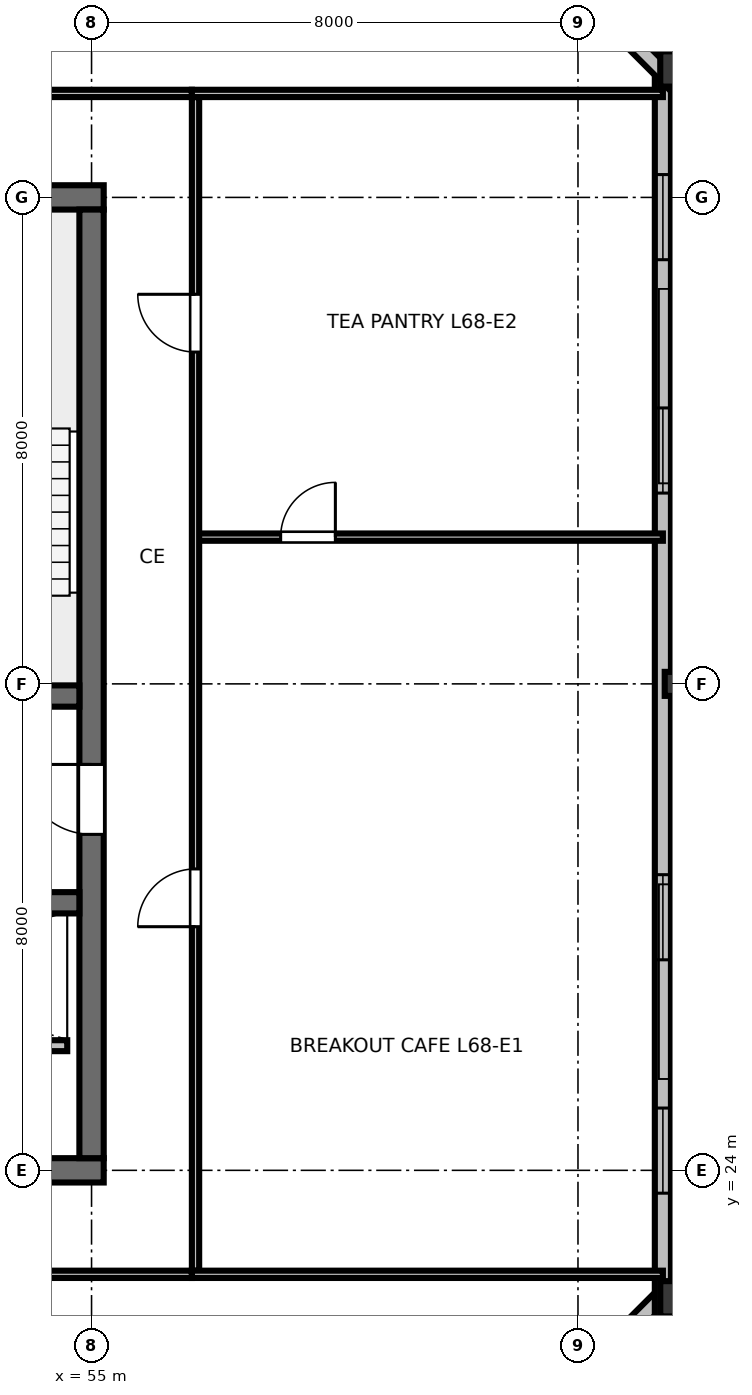
"""IFC4 building model, lengths in metres.
Left out: names, types, materials, properties, quantities, classifications, styles, units other than length and angle.
Written with IfcOpenShell. Run it as: python <this file> out.ifc"""

import sys

from ifc_helpers import new_model, si_unit, direction, frame, frame_2d, origin, origin_2d, place, context, subcontext, project, spatial, rectangle, hollow_rectangle, i_section, extrude, element, fill, save


model = new_model("IFC4")
c1 = context("Model", 3, precision=1e-05, world=origin(), true_north=direction((0.0, 1.0)))
c2 = subcontext(c1, "Body", "Model", "MODEL_VIEW")
j1 = project(units=[si_unit("LENGTHUNIT", "METRE"), si_unit("PLANEANGLEUNIT", "RADIAN")], contexts=[c1])
p1 = place(None, origin())
s1 = spatial("IfcSite", under=j1, at=p1, CompositionType="ELEMENT")
p2 = place(p1, origin())
s2 = spatial("IfcBuilding", under=s1, at=p2, CompositionType="ELEMENT")
p3 = place(p2, frame((0.0, 0.0, 257.4)))
s3 = spatial("IfcBuildingStorey", under=s2, at=p3, CompositionType="ELEMENT", Elevation=257.4)
p4 = place(p3, frame((36.8, 24.0, 0.0), z_axis=(0.0, 0.0, 1.0), x_axis=(1.0, 0.0, 0.0)))
e1 = element("IfcWall", 1, at=p4, inside=s3, PredefinedType="SHEAR", context=c2, shape_type="SweptSolid", body=[
    extrude(rectangle(XDim=18.4, YDim=0.4, at=frame_2d((9.2, 0.0))), origin(), (0.0, 0.0, 1.0), 3.36),
])
p5 = place(p4, frame((13.4, 0.0, 0.0)))
e2 = element("IfcOpeningElement", 2, at=p5, cuts=e1, PredefinedType="OPENING", context=c2, shape_type="SweptSolid", body=[
    extrude(rectangle(XDim=1.6, YDim=2.15, at=frame_2d((0.8, 1.075))), frame((0.0, 0.21, 0.0), z_axis=(0.0, -1.0, 0.0), x_axis=(1.0, 0.0, 0.0)), (0.0, 0.0, 1.0), 0.42),
])
p6 = place(p3, frame((36.8, 40.0, 0.0), z_axis=(0.0, 0.0, 1.0), x_axis=(1.0, 0.0, 0.0)))
e3 = element("IfcWall", 3, at=p6, inside=s3, PredefinedType="SHEAR", context=c2, shape_type="SweptSolid", body=[
    extrude(rectangle(XDim=18.4, YDim=0.4, at=frame_2d((9.2, 0.0))), origin(), (0.0, 0.0, 1.0), 3.36),
])
p7 = place(p6, frame((8.7, 0.0, 0.0)))
e4 = element("IfcOpeningElement", 4, at=p7, cuts=e3, PredefinedType="OPENING", context=c2, shape_type="SweptSolid", body=[
    extrude(rectangle(XDim=1.0, YDim=2.15, at=frame_2d((0.5, 1.075))), frame((0.0, 0.21, 0.0), z_axis=(0.0, -1.0, 0.0), x_axis=(1.0, 0.0, 0.0)), (0.0, 0.0, 1.0), 0.42),
])
p8 = place(p3, frame((55.0, 24.2, 0.0), z_axis=(0.0, 0.0, 1.0), x_axis=(0.0, 1.0, 0.0)))
e5 = element("IfcWall", 5, at=p8, inside=s3, PredefinedType="SHEAR", context=c2, shape_type="SweptSolid", body=[
    extrude(rectangle(XDim=15.6, YDim=0.4, at=frame_2d((7.8, 0.0))), origin(), (0.0, 0.0, 1.0), 3.36),
])
p9 = place(p8, frame((5.325, 0.0, 0.0)))
e6 = element("IfcOpeningElement", 6, at=p9, cuts=e5, PredefinedType="OPENING", context=c2, shape_type="SweptSolid", body=[
    extrude(rectangle(XDim=1.15, YDim=2.15, at=frame_2d((0.575, 1.075))), frame((0.0, 0.21, 0.0), z_axis=(0.0, -1.0, 0.0), x_axis=(1.0, 0.0, 0.0)), (0.0, 0.0, 1.0), 0.42),
])
p10 = place(p3, frame((37.2, 31.8, 0.0), z_axis=(0.0, 0.0, 1.0), x_axis=(1.0, 0.0, 0.0)))
e7 = element("IfcWall", 7, at=p10, inside=s3, PredefinedType="SHEAR", context=c2, shape_type="SweptSolid", body=[
    extrude(rectangle(XDim=17.6, YDim=0.35, at=frame_2d((8.8, 0.0))), origin(), (0.0, 0.0, 1.0), 3.36),
])
p11 = place(p10, frame((0.85, 0.0, 0.0)))
e8 = element("IfcOpeningElement", 8, at=p11, cuts=e7, PredefinedType="OPENING", context=c2, shape_type="SweptSolid", body=[
    extrude(rectangle(XDim=1.1, YDim=2.15, at=frame_2d((0.55, 1.075))), frame((0.0, 0.185, 0.0), z_axis=(0.0, -1.0, 0.0), x_axis=(1.0, 0.0, 0.0)), (0.0, 0.0, 1.0), 0.37),
])
p12 = place(p10, frame((14.75, 0.0, 0.0)))
e9 = element("IfcOpeningElement", 9, at=p12, cuts=e7, PredefinedType="OPENING", context=c2, shape_type="SweptSolid", body=[
    extrude(rectangle(XDim=1.1, YDim=2.15, at=frame_2d((0.55, 1.075))), frame((0.0, 0.185, 0.0), z_axis=(0.0, -1.0, 0.0), x_axis=(1.0, 0.0, 0.0)), (0.0, 0.0, 1.0), 0.37),
])
p13 = place(p3, frame((37.2, 28.4, 0.0), z_axis=(0.0, 0.0, 1.0), x_axis=(1.0, 0.0, 0.0)))
e10 = element("IfcWall", 10, at=p13, inside=s3, PredefinedType="SHEAR", context=c2, shape_type="SweptSolid", body=[
    extrude(rectangle(XDim=17.6, YDim=0.35, at=frame_2d((8.8, 0.0))), origin(), (0.0, 0.0, 1.0), 3.36),
])
p14 = place(p3, frame((64.703, 21.888, 0.0), z_axis=(-0.177662325412, 0.155507284832, 0.971727113182), x_axis=(0.731191579458, -0.640009731663, 0.23610679259)))
e11 = element("IfcColumn", 11, at=p14, inside=s3, PredefinedType="COLUMN", context=c2, shape_type="SweptSolid", body=[
    extrude(hollow_rectangle(XDim=0.58, YDim=0.7, WallThickness=0.032, at=origin_2d()), origin(), (0.0, 0.0, 1.0), 3.471),
])
p15 = place(p3, frame((64.616, 32.0, 0.0), z_axis=(-0.179023300051, 0.0, 0.98384483433), x_axis=(0.98384483433, 0.0, 0.179023300051)))
e12 = element("IfcColumn", 12, at=p15, inside=s3, PredefinedType="COLUMN", context=c2, shape_type="SweptSolid", body=[
    extrude(i_section(OverallWidth=0.395, OverallDepth=0.38, WebThickness=0.019, FlangeThickness=0.03, FilletRadius=0.025, at=origin_2d()), origin(), (0.0, 0.0, 1.0), 3.428),
])
p16 = place(p3, frame((64.703, 42.112, 0.0), z_axis=(-0.177662325412, -0.155507284832, 0.971727113182), x_axis=(0.731191579458, 0.640009731663, 0.23610679259)))
e13 = element("IfcColumn", 13, at=p16, inside=s3, PredefinedType="COLUMN", context=c2, shape_type="SweptSolid", body=[
    extrude(hollow_rectangle(XDim=0.58, YDim=0.7, WallThickness=0.032, at=origin_2d()), origin(), (0.0, 0.0, 1.0), 3.471),
])
p17 = place(p3, frame((57.193, 14.731, 0.0), z_axis=(0.0, 0.0, 1.0), x_axis=(0.707106781187, 0.707106781187, 0.0)))
e14 = element("IfcWall", 14, at=p17, inside=s3, PredefinedType="STANDARD", context=c2, shape_type="SweptSolid", body=[
    extrude(rectangle(XDim=10.816, YDim=0.265, at=frame_2d((5.408, 0.0))), origin(), (0.0, 0.0, 1.0), 3.375),
])
p18 = place(p3, frame((64.396, 21.305, 0.0), z_axis=(0.0, 0.0, 1.0), x_axis=(0.0, 1.0, 0.0)))
e15 = element("IfcWall", 15, at=p18, inside=s3, PredefinedType="STANDARD", context=c2, shape_type="SweptSolid", body=[
    extrude(rectangle(XDim=21.389, YDim=0.265, at=frame_2d((10.695, 0.0))), origin(), (0.0, 0.0, 1.0), 2.832),
])
p19 = place(p18, frame((2.319, 0.0, 0.85)))
e16 = element("IfcOpeningElement", 16, at=p19, cuts=e15, PredefinedType="OPENING", context=c2, shape_type="SweptSolid", body=[
    extrude(rectangle(XDim=1.4, YDim=1.2, at=frame_2d((0.7, 0.6))), frame((0.0, 0.142, 0.0), z_axis=(0.0, -1.0, 0.0), x_axis=(1.0, 0.0, 0.0)), (0.0, 0.0, 1.0), 0.285),
])
p20 = place(p18, frame((6.157, 0.0, 0.85)))
e17 = element("IfcOpeningElement", 17, at=p20, cuts=e15, PredefinedType="OPENING", context=c2, shape_type="SweptSolid", body=[
    extrude(rectangle(XDim=1.4, YDim=1.2, at=frame_2d((0.7, 0.6))), frame((0.0, 0.142, 0.0), z_axis=(0.0, -1.0, 0.0), x_axis=(1.0, 0.0, 0.0)), (0.0, 0.0, 1.0), 0.285),
])
p21 = place(p18, frame((13.832, 0.0, 0.85)))
e18 = element("IfcOpeningElement", 18, at=p21, cuts=e15, PredefinedType="OPENING", context=c2, shape_type="SweptSolid", body=[
    extrude(rectangle(XDim=1.4, YDim=1.2, at=frame_2d((0.7, 0.6))), frame((0.0, 0.142, 0.0), z_axis=(0.0, -1.0, 0.0), x_axis=(1.0, 0.0, 0.0)), (0.0, 0.0, 1.0), 0.285),
])
p22 = place(p18, frame((17.67, 0.0, 0.85)))
e19 = element("IfcOpeningElement", 19, at=p22, cuts=e15, PredefinedType="OPENING", context=c2, shape_type="SweptSolid", body=[
    extrude(rectangle(XDim=1.4, YDim=1.2, at=frame_2d((0.7, 0.6))), frame((0.0, 0.142, 0.0), z_axis=(0.0, -1.0, 0.0), x_axis=(1.0, 0.0, 0.0)), (0.0, 0.0, 1.0), 0.285),
])
p23 = place(p3, frame((64.841, 41.62, 0.0), z_axis=(0.0, 0.0, 1.0), x_axis=(-0.707106781187, 0.707106781187, 0.0)))
e20 = element("IfcWall", 20, at=p23, inside=s3, PredefinedType="STANDARD", context=c2, shape_type="SweptSolid", body=[
    extrude(rectangle(XDim=10.816, YDim=0.265, at=frame_2d((5.408, 0.0))), origin(), (0.0, 0.0, 1.0), 3.375),
])
p24 = place(p3, frame((47.6, 26.05, 0.0), z_axis=(0.0, 0.0, 1.0), x_axis=(1.0, 0.0, 0.0)))
e21 = element("IfcWall", 21, at=p24, inside=s3, PredefinedType="PARTITIONING", context=c2, shape_type="SweptSolid", body=[
    extrude(rectangle(XDim=7.0, YDim=0.18, at=frame_2d((3.5, 0.0))), origin(), (0.0, 0.0, 1.0), 3.375),
])
p25 = place(p24, frame((1.2, 0.0, 0.0)))
e22 = element("IfcOpeningElement", 22, at=p25, cuts=e21, PredefinedType="OPENING", context=c2, shape_type="SweptSolid", body=[
    extrude(rectangle(XDim=1.05, YDim=2.15, at=frame_2d((0.525, 1.075))), frame((0.0, 0.1, 0.0), z_axis=(0.0, -1.0, 0.0), x_axis=(1.0, 0.0, 0.0)), (0.0, 0.0, 1.0), 0.2),
])
p26 = place(p24, frame((3.4, 0.0, 0.0)))
e23 = element("IfcOpeningElement", 23, at=p26, cuts=e21, PredefinedType="OPENING", context=c2, shape_type="SweptSolid", body=[
    extrude(rectangle(XDim=1.05, YDim=2.15, at=frame_2d((0.525, 1.075))), frame((0.0, 0.1, 0.0), z_axis=(0.0, -1.0, 0.0), x_axis=(1.0, 0.0, 0.0)), (0.0, 0.0, 1.0), 0.2),
])
p27 = place(p3, frame((35.35, 22.29, 0.0), z_axis=(0.0, 0.0, 1.0), x_axis=(1.0, 0.0, 0.0)))
e24 = element("IfcWall", 24, at=p27, inside=s3, PredefinedType="PARTITIONING", context=c2, shape_type="SweptSolid", body=[
    extrude(rectangle(XDim=21.3, YDim=0.12, at=frame_2d((10.65, 0.0))), origin(), (0.0, 0.0, 1.0), 2.655),
])
p28 = place(p27, frame((3.767, 0.0, 0.0)))
e25 = element("IfcOpeningElement", 25, at=p28, cuts=e24, PredefinedType="OPENING", context=c2, shape_type="SweptSolid", body=[
    extrude(rectangle(XDim=0.95, YDim=2.15, at=frame_2d((0.475, 1.075))), frame((0.0, 0.07, 0.0), z_axis=(0.0, -1.0, 0.0), x_axis=(1.0, 0.0, 0.0)), (0.0, 0.0, 1.0), 0.14),
])
p29 = place(p27, frame((15.925, 0.0, 0.0)))
e26 = element("IfcOpeningElement", 26, at=p29, cuts=e24, PredefinedType="OPENING", context=c2, shape_type="SweptSolid", body=[
    extrude(rectangle(XDim=0.95, YDim=2.15, at=frame_2d((0.475, 1.075))), frame((0.0, 0.07, 0.0), z_axis=(0.0, -1.0, 0.0), x_axis=(1.0, 0.0, 0.0)), (0.0, 0.0, 1.0), 0.14),
])
p30 = place(p3, frame((35.35, 41.71, 0.0), z_axis=(0.0, 0.0, 1.0), x_axis=(1.0, 0.0, 0.0)))
e27 = element("IfcWall", 27, at=p30, inside=s3, PredefinedType="PARTITIONING", context=c2, shape_type="SweptSolid", body=[
    extrude(rectangle(XDim=21.3, YDim=0.12, at=frame_2d((10.65, 0.0))), origin(), (0.0, 0.0, 1.0), 2.655),
])
p31 = place(p30, frame((3.472, 0.0, 0.0)))
e28 = element("IfcOpeningElement", 28, at=p31, cuts=e27, PredefinedType="OPENING", context=c2, shape_type="SweptSolid", body=[
    extrude(rectangle(XDim=0.95, YDim=2.15, at=frame_2d((0.475, 1.075))), frame((0.0, 0.07, 0.0), z_axis=(0.0, -1.0, 0.0), x_axis=(1.0, 0.0, 0.0)), (0.0, 0.0, 1.0), 0.14),
])
p32 = place(p30, frame((12.975, 0.0, 0.0)))
e29 = element("IfcOpeningElement", 29, at=p32, cuts=e27, PredefinedType="OPENING", context=c2, shape_type="SweptSolid", body=[
    extrude(rectangle(XDim=0.95, YDim=2.15, at=frame_2d((0.475, 1.075))), frame((0.0, 0.07, 0.0), z_axis=(0.0, -1.0, 0.0), x_axis=(1.0, 0.0, 0.0)), (0.0, 0.0, 1.0), 0.14),
])
p33 = place(p30, frame((17.735, 0.0, 0.0)))
e30 = element("IfcOpeningElement", 30, at=p33, cuts=e27, PredefinedType="OPENING", context=c2, shape_type="SweptSolid", body=[
    extrude(rectangle(XDim=0.95, YDim=2.15, at=frame_2d((0.475, 1.075))), frame((0.0, 0.07, 0.0), z_axis=(0.0, -1.0, 0.0), x_axis=(1.0, 0.0, 0.0)), (0.0, 0.0, 1.0), 0.14),
])
p34 = place(p3, frame((56.71, 34.413, 0.0), z_axis=(0.0, 0.0, 1.0), x_axis=(1.0, 0.0, 0.0)))
e31 = element("IfcWall", 31, at=p34, inside=s3, PredefinedType="PARTITIONING", context=c2, shape_type="SweptSolid", body=[
    extrude(rectangle(XDim=7.687, YDim=0.12, at=frame_2d((3.843, 0.0))), origin(), (0.0, 0.0, 1.0), 2.655),
])
p35 = place(p34, frame((1.4, 0.0, 0.0)))
e32 = element("IfcOpeningElement", 32, at=p35, cuts=e31, PredefinedType="OPENING", context=c2, shape_type="SweptSolid", body=[
    extrude(rectangle(XDim=0.9, YDim=2.15, at=frame_2d((0.45, 1.075))), frame((0.0, 0.07, 0.0), z_axis=(0.0, -1.0, 0.0), x_axis=(1.0, 0.0, 0.0)), (0.0, 0.0, 1.0), 0.14),
])
p36 = place(p3, frame((56.71, 22.35, 0.0), z_axis=(0.0, 0.0, 1.0), x_axis=(0.0, 1.0, 0.0)))
e33 = element("IfcWall", 33, at=p36, inside=s3, PredefinedType="PARTITIONING", context=c2, shape_type="SweptSolid", body=[
    extrude(rectangle(XDim=19.3, YDim=0.12, at=frame_2d((9.65, 0.0))), origin(), (0.0, 0.0, 1.0), 2.655),
])
p37 = place(p36, frame((5.657, 0.0, 0.0)))
e34 = element("IfcOpeningElement", 34, at=p37, cuts=e33, PredefinedType="OPENING", context=c2, shape_type="SweptSolid", body=[
    extrude(rectangle(XDim=0.95, YDim=2.15, at=frame_2d((0.475, 1.075))), frame((0.0, 0.07, 0.0), z_axis=(0.0, -1.0, 0.0), x_axis=(1.0, 0.0, 0.0)), (0.0, 0.0, 1.0), 0.14),
])
p38 = place(p36, frame((15.107, 0.0, 0.0)))
e35 = element("IfcOpeningElement", 35, at=p38, cuts=e33, PredefinedType="OPENING", context=c2, shape_type="SweptSolid", body=[
    extrude(rectangle(XDim=0.95, YDim=2.15, at=frame_2d((0.475, 1.075))), frame((0.0, 0.07, 0.0), z_axis=(0.0, -1.0, 0.0), x_axis=(1.0, 0.0, 0.0)), (0.0, 0.0, 1.0), 0.14),
])
for number, where, z_axis, x_axis in (
    (36, (56.65, 22.29, 0.0), (0.0, 0.0, 1.0), (1.0, 0.0, 0.0)),
    (37, (56.65, 41.71, 0.0), (0.0, 0.0, 1.0), (1.0, 0.0, 0.0)),
):
    element("IfcWall", number, at=place(p3, frame(where, z_axis=z_axis, x_axis=x_axis)), inside=s3, PredefinedType="PARTITIONING", context=c2, shape_type="SweptSolid", body=[
        extrude(rectangle(XDim=7.747, YDim=0.12, at=frame_2d((3.873, 0.0))), origin(), (0.0, 0.0, 1.0), 2.655),
    ])
p39 = place(p19, origin())
e38 = element("IfcWindow", 38, at=p39, inside=s3, PartitioningType="SINGLE_PANEL", PredefinedType="WINDOW", context=c2, shape_type="SweptSolid", body=[
    extrude(rectangle(XDim=1.4, YDim=1.2, at=frame_2d((0.7, 0.6))), frame((0.0, 0.03, 0.0), z_axis=(0.0, -1.0, 0.0), x_axis=(1.0, 0.0, 0.0)), (0.0, 0.0, 1.0), 0.06),
])
fill(e16, e38)
p40 = place(p20, origin())
e39 = element("IfcWindow", 39, at=p40, inside=s3, PartitioningType="SINGLE_PANEL", PredefinedType="WINDOW", context=c2, shape_type="SweptSolid", body=[
    extrude(rectangle(XDim=1.4, YDim=1.2, at=frame_2d((0.7, 0.6))), frame((0.0, 0.03, 0.0), z_axis=(0.0, -1.0, 0.0), x_axis=(1.0, 0.0, 0.0)), (0.0, 0.0, 1.0), 0.06),
])
fill(e17, e39)
p41 = place(p21, origin())
e40 = element("IfcWindow", 40, at=p41, inside=s3, PartitioningType="SINGLE_PANEL", PredefinedType="WINDOW", context=c2, shape_type="SweptSolid", body=[
    extrude(rectangle(XDim=1.4, YDim=1.2, at=frame_2d((0.7, 0.6))), frame((0.0, 0.03, 0.0), z_axis=(0.0, -1.0, 0.0), x_axis=(1.0, 0.0, 0.0)), (0.0, 0.0, 1.0), 0.06),
])
fill(e18, e40)
p42 = place(p22, origin())
e41 = element("IfcWindow", 41, at=p42, inside=s3, PartitioningType="SINGLE_PANEL", PredefinedType="WINDOW", context=c2, shape_type="SweptSolid", body=[
    extrude(rectangle(XDim=1.4, YDim=1.2, at=frame_2d((0.7, 0.6))), frame((0.0, 0.03, 0.0), z_axis=(0.0, -1.0, 0.0), x_axis=(1.0, 0.0, 0.0)), (0.0, 0.0, 1.0), 0.06),
])
fill(e19, e41)
p43 = place(p9, origin())
e42 = element("IfcDoor", 42, at=p43, inside=s3, OperationType="SINGLE_SWING_RIGHT", PredefinedType="DOOR", context=c2, shape_type="SweptSolid", body=[
    extrude(rectangle(XDim=1.15, YDim=2.15, at=frame_2d((0.575, 1.075))), frame((0.0, 0.025, 0.0), z_axis=(0.0, -1.0, 0.0), x_axis=(1.0, 0.0, 0.0)), (0.0, 0.0, 1.0), 0.05),
])
fill(e6, e42)
p44 = place(p35, origin())
e43 = element("IfcDoor", 43, at=p44, inside=s3, OperationType="SINGLE_SWING_RIGHT", PredefinedType="DOOR", context=c2, shape_type="SweptSolid", body=[
    extrude(rectangle(XDim=0.9, YDim=2.15, at=frame_2d((0.45, 1.075))), frame((0.0, 0.025, 0.0), z_axis=(0.0, -1.0, 0.0), x_axis=(1.0, 0.0, 0.0)), (0.0, 0.0, 1.0), 0.05),
])
fill(e32, e43)
p45 = place(p37, origin())
e44 = element("IfcDoor", 44, at=p45, inside=s3, OperationType="SINGLE_SWING_LEFT", PredefinedType="DOOR", context=c2, shape_type="SweptSolid", body=[
    extrude(rectangle(XDim=0.95, YDim=2.15, at=frame_2d((0.475, 1.075))), frame((0.0, 0.025, 0.0), z_axis=(0.0, -1.0, 0.0), x_axis=(1.0, 0.0, 0.0)), (0.0, 0.0, 1.0), 0.05),
])
fill(e34, e44)
p46 = place(p38, origin())
e45 = element("IfcDoor", 45, at=p46, inside=s3, OperationType="SINGLE_SWING_RIGHT", PredefinedType="DOOR", context=c2, shape_type="SweptSolid", body=[
    extrude(rectangle(XDim=0.95, YDim=2.15, at=frame_2d((0.475, 1.075))), frame((0.0, 0.025, 0.0), z_axis=(0.0, -1.0, 0.0), x_axis=(1.0, 0.0, 0.0)), (0.0, 0.0, 1.0), 0.05),
])
fill(e35, e45)
save(model, sys.argv[1])
